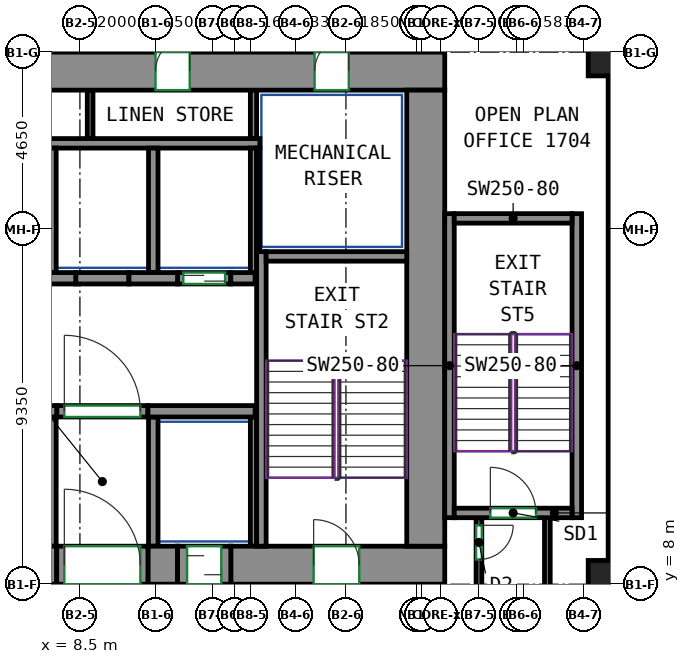
"""IFC4 building model, lengths in metres.
Left out: names, types, materials, properties, quantities, classifications, styles, units other than length and angle.
Written with IfcOpenShell. Run it as: python <this file> out.ifc"""

import sys

from ifc_helpers import new_model, si_unit, direction, frame, frame_2d, origin, origin_2d, place, context, subcontext, project, spatial, rectangle, extrude, source, transform, mapped, element, fill, save


model = new_model("IFC4")
c1 = context("Model", 3, precision=1e-05, world=origin(), true_north=direction((0.0, 1.0)))
c2 = subcontext(c1, "Body", "Model", "MODEL_VIEW")
j1 = project(units=[si_unit("LENGTHUNIT", "METRE"), si_unit("PLANEANGLEUNIT", "RADIAN")], contexts=[c1])
p1 = place(None, origin())
s1 = spatial("IfcSite", under=j1, at=p1, CompositionType="ELEMENT")
p2 = place(p1, origin())
s2 = spatial("IfcBuilding", under=s1, at=p2, CompositionType="ELEMENT")
p3 = place(p2, frame((0.0, 0.0, 75.2)))
s3 = spatial("IfcBuildingStorey", under=s2, at=p3, CompositionType="ELEMENT", Elevation=75.2)
m1 = source(origin(), c2, "Body", "SweptSolid", [
    extrude(rectangle(XDim=1.25, YDim=1.25, at=origin_2d()), origin(), (0.0, 0.0, 1.0), 3.72),
])
for number, where, z_axis, x_axis in (
    (1, (22.5, 8.0, 0.0), (0.0, 0.0, 1.0), (1.0, 0.0, 0.0)),
    (2, (22.5, 22.0, 0.0), (0.0, 0.0, 1.0), (1.0, 0.0, 0.0)),
):
    element("IfcColumn", number, at=place(p3, frame(where, z_axis=z_axis, x_axis=x_axis)), inside=s3, PredefinedType="COLUMN", context=c2, shape_type="MappedRepresentation", body=[
        mapped(m1, transform((0.0, 0.0, 0.0))),
    ])
m2 = source(origin(), c2, "Body", "SweptSolid", [
    extrude(rectangle(XDim=14.18, YDim=1.0, at=frame_2d((7.09, 0.0))), origin(), (0.0, 0.0, 1.0), 3.72),
])
p4 = place(p3, frame((-6.29, 8.5, 0.0), z_axis=(0.0, 0.0, 1.0), x_axis=(1.0, 0.0, 0.0)))
e3 = element("IfcWall", 3, at=p4, inside=s3, PredefinedType="SHEAR", context=c2, shape_type="MappedRepresentation", body=[
    mapped(m2, transform((0.0, 0.0, 0.0))),
])
m3 = source(origin(), c2, "Body", "SweptSolid", [
    extrude(rectangle(XDim=0.78, YDim=1.0, at=frame_2d((0.39, 0.0))), origin(), (0.0, 0.0, 1.0), 3.72),
])
p5 = place(p3, frame((10.29, 8.5, 0.0), z_axis=(0.0, 0.0, 1.0), x_axis=(1.0, 0.0, 0.0)))
e4 = element("IfcWall", 4, at=p5, inside=s3, PredefinedType="SHEAR", context=c2, shape_type="MappedRepresentation", body=[
    mapped(m3, transform((0.0, 0.0, 0.0))),
])
m4 = source(origin(), c2, "Body", "SweptSolid", [
    extrude(rectangle(XDim=5.63, YDim=1.0, at=frame_2d((2.815, 0.0))), origin(), (0.0, 0.0, 1.0), 3.72),
])
p6 = place(p3, frame((12.47, 8.5, 0.0), z_axis=(0.0, 0.0, 1.0), x_axis=(1.0, 0.0, 0.0)))
e5 = element("IfcWall", 5, at=p6, inside=s3, PredefinedType="SHEAR", context=c2, shape_type="MappedRepresentation", body=[
    mapped(m4, transform((0.0, 0.0, 0.0))),
])
p7 = place(p6, frame((2.18, 0.0, 0.0)))
e6 = element("IfcOpeningElement", 6, at=p7, cuts=e5, PredefinedType="OPENING", context=c2, shape_type="SweptSolid", body=[
    extrude(rectangle(XDim=1.2, YDim=2.1, at=frame_2d((0.6, 1.05))), frame((0.0, 0.51, 0.0), z_axis=(0.0, -1.0, 0.0), x_axis=(1.0, 0.0, 0.0)), (0.0, 0.0, 1.0), 1.02),
])
m5 = source(origin(), c2, "Body", "SweptSolid", [
    extrude(rectangle(XDim=34.1, YDim=1.0, at=frame_2d((17.05, 0.0))), origin(), (0.0, 0.0, 1.0), 3.72),
])
p8 = place(p3, frame((-16.0, 21.5, 0.0), z_axis=(0.0, 0.0, 1.0), x_axis=(1.0, 0.0, 0.0)))
e7 = element("IfcWall", 7, at=p8, inside=s3, PredefinedType="SHEAR", context=c2, shape_type="MappedRepresentation", body=[
    mapped(m5, transform((0.0, 0.0, 0.0))),
])
p9 = place(p8, frame((6.108, 0.0, 0.0)))
e8 = element("IfcOpeningElement", 8, at=p9, cuts=e7, PredefinedType="OPENING", context=c2, shape_type="SweptSolid", body=[
    extrude(rectangle(XDim=0.9, YDim=2.1, at=frame_2d((0.45, 1.05))), frame((0.0, 0.51, 0.0), z_axis=(0.0, -1.0, 0.0), x_axis=(1.0, 0.0, 0.0)), (0.0, 0.0, 1.0), 1.02),
])
p10 = place(p8, frame((11.173, 0.0, 0.0)))
e9 = element("IfcOpeningElement", 9, at=p10, cuts=e7, PredefinedType="OPENING", context=c2, shape_type="SweptSolid", body=[
    extrude(rectangle(XDim=0.9, YDim=2.1, at=frame_2d((0.45, 1.05))), frame((0.0, 0.51, 0.0), z_axis=(0.0, -1.0, 0.0), x_axis=(1.0, 0.0, 0.0)), (0.0, 0.0, 1.0), 1.02),
])
p11 = place(p8, frame((16.238, 0.0, 0.0)))
e10 = element("IfcOpeningElement", 10, at=p11, cuts=e7, PredefinedType="OPENING", context=c2, shape_type="SweptSolid", body=[
    extrude(rectangle(XDim=0.9, YDim=2.1, at=frame_2d((0.45, 1.05))), frame((0.0, 0.51, 0.0), z_axis=(0.0, -1.0, 0.0), x_axis=(1.0, 0.0, 0.0)), (0.0, 0.0, 1.0), 1.02),
])
p12 = place(p8, frame((21.062, 0.0, 0.0)))
e11 = element("IfcOpeningElement", 11, at=p12, cuts=e7, PredefinedType="OPENING", context=c2, shape_type="SweptSolid", body=[
    extrude(rectangle(XDim=0.9, YDim=2.1, at=frame_2d((0.45, 1.05))), frame((0.0, 0.51, 0.0), z_axis=(0.0, -1.0, 0.0), x_axis=(1.0, 0.0, 0.0)), (0.0, 0.0, 1.0), 1.02),
])
p13 = place(p8, frame((26.489, 0.0, 0.0)))
e12 = element("IfcOpeningElement", 12, at=p13, cuts=e7, PredefinedType="OPENING", context=c2, shape_type="SweptSolid", body=[
    extrude(rectangle(XDim=0.9, YDim=2.1, at=frame_2d((0.45, 1.05))), frame((0.0, 0.51, 0.0), z_axis=(0.0, -1.0, 0.0), x_axis=(1.0, 0.0, 0.0)), (0.0, 0.0, 1.0), 1.02),
])
p14 = place(p8, frame((2.525, 0.0, 0.0)))
e13 = element("IfcOpeningElement", 13, at=p14, cuts=e7, PredefinedType="OPENING", context=c2, shape_type="SweptSolid", body=[
    extrude(rectangle(XDim=0.9, YDim=2.1, at=frame_2d((0.45, 1.05))), frame((0.0, 0.51, 0.0), z_axis=(0.0, -1.0, 0.0), x_axis=(1.0, 0.0, 0.0)), (0.0, 0.0, 1.0), 1.02),
])
p15 = place(p8, frame((30.675, 0.0, 0.0)))
e14 = element("IfcOpeningElement", 14, at=p15, cuts=e7, PredefinedType="OPENING", context=c2, shape_type="SweptSolid", body=[
    extrude(rectangle(XDim=0.9, YDim=2.1, at=frame_2d((0.45, 1.05))), frame((0.0, 0.51, 0.0), z_axis=(0.0, -1.0, 0.0), x_axis=(1.0, 0.0, 0.0)), (0.0, 0.0, 1.0), 1.02),
])
m6 = source(origin(), c2, "Body", "SweptSolid", [
    extrude(rectangle(XDim=12.0, YDim=1.0, at=frame_2d((6.0, 0.0))), origin(), (0.0, 0.0, 1.0), 3.72),
])
p16 = place(p3, frame((17.6, 9.0, 0.0), z_axis=(0.0, 0.0, 1.0), x_axis=(0.0, 1.0, 0.0)))
e15 = element("IfcWall", 15, at=p16, inside=s3, PredefinedType="SHEAR", context=c2, shape_type="MappedRepresentation", body=[
    mapped(m6, transform((0.0, 0.0, 0.0))),
])
m7 = source(origin(), c2, "Body", "SweptSolid", [
    extrude(rectangle(XDim=7.75, YDim=0.25, at=frame_2d((3.875, 0.0))), origin(), (0.0, 0.0, 1.0), 3.72),
])
p17 = place(p3, frame((13.275, 9.0, 0.0), z_axis=(0.0, 0.0, 1.0), x_axis=(0.0, 1.0, 0.0)))
e16 = element("IfcWall", 16, at=p17, inside=s3, PredefinedType="SHEAR", context=c2, shape_type="MappedRepresentation", body=[
    mapped(m7, transform((0.0, 0.0, 0.0))),
])
m8 = source(origin(), c2, "Body", "SweptSolid", [
    extrude(rectangle(XDim=3.7, YDim=0.25, at=frame_2d((1.85, 0.0))), origin(), (0.0, 0.0, 1.0), 3.72),
])
p18 = place(p3, frame((13.4, 16.625, 0.0), z_axis=(0.0, 0.0, 1.0), x_axis=(1.0, 0.0, 0.0)))
e17 = element("IfcWall", 17, at=p18, inside=s3, PredefinedType="SHEAR", context=c2, shape_type="MappedRepresentation", body=[
    mapped(m8, transform((0.0, 0.0, 0.0))),
])
m9 = source(origin(), c2, "Body", "SweptSolid", [
    extrude(rectangle(XDim=8.0, YDim=0.25, at=frame_2d((4.0, 0.0))), origin(), (0.0, 0.0, 1.0), 3.72),
])
for number, where, z_axis, x_axis in (
    (18, (18.225, 9.75, 0.0), (0.0, 0.0, 1.0), (0.0, 1.0, 0.0)),
    (19, (21.575, 9.75, 0.0), (0.0, 0.0, 1.0), (0.0, 1.0, 0.0)),
):
    element("IfcWall", number, at=place(p3, frame(where, z_axis=z_axis, x_axis=x_axis)), inside=s3, PredefinedType="SHEAR", context=c2, shape_type="MappedRepresentation", body=[
        mapped(m9, transform((0.0, 0.0, 0.0))),
    ])
m10 = source(origin(), c2, "Body", "SweptSolid", [
    extrude(rectangle(XDim=3.1, YDim=0.25, at=frame_2d((1.55, 0.0))), origin(), (0.0, 0.0, 1.0), 3.72),
])
p19 = place(p3, frame((18.35, 9.875, 0.0), z_axis=(0.0, 0.0, 1.0), x_axis=(1.0, 0.0, 0.0)))
e20 = element("IfcWall", 20, at=p19, inside=s3, PredefinedType="SHEAR", context=c2, shape_type="MappedRepresentation", body=[
    mapped(m10, transform((0.0, 0.0, 0.0))),
])
p20 = place(p19, frame((0.95, 0.0, 0.0)))
e21 = element("IfcOpeningElement", 21, at=p20, cuts=e20, PredefinedType="OPENING", context=c2, shape_type="SweptSolid", body=[
    extrude(rectangle(XDim=1.2, YDim=2.1, at=frame_2d((0.6, 1.05))), frame((0.0, 0.135, 0.0), z_axis=(0.0, -1.0, 0.0), x_axis=(1.0, 0.0, 0.0)), (0.0, 0.0, 1.0), 0.27),
])
p21 = place(p3, frame((18.35, 17.625, 0.0), z_axis=(0.0, 0.0, 1.0), x_axis=(1.0, 0.0, 0.0)))
e22 = element("IfcWall", 22, at=p21, inside=s3, PredefinedType="SHEAR", context=c2, shape_type="MappedRepresentation", body=[
    mapped(m10, transform((0.0, 0.0, 0.0))),
])
m11 = source(origin(), c2, "Body", "SweptSolid", [
    extrude(rectangle(XDim=0.78, YDim=0.3, at=frame_2d((0.39, 0.0))), origin(), (0.0, 0.0, 1.0), 3.72),
])
p22 = place(p3, frame((7.11, 12.55, 0.0), z_axis=(0.0, 0.0, 1.0), x_axis=(1.0, 0.0, 0.0)))
e23 = element("IfcWall", 23, at=p22, inside=s3, PredefinedType="SHEAR", context=c2, shape_type="MappedRepresentation", body=[
    mapped(m11, transform((0.0, 0.0, 0.0))),
])
m12 = source(origin(), c2, "Body", "SweptSolid", [
    extrude(rectangle(XDim=2.82, YDim=0.3, at=frame_2d((1.41, 0.0))), origin(), (0.0, 0.0, 1.0), 3.72),
])
p23 = place(p3, frame((10.29, 12.55, 0.0), z_axis=(0.0, 0.0, 1.0), x_axis=(1.0, 0.0, 0.0)))
e24 = element("IfcWall", 24, at=p23, inside=s3, PredefinedType="SHEAR", context=c2, shape_type="MappedRepresentation", body=[
    mapped(m12, transform((0.0, 0.0, 0.0))),
])
m13 = source(origin(), c2, "Body", "SweptSolid", [
    extrude(rectangle(XDim=1.28, YDim=0.3, at=frame_2d((0.64, 0.0))), origin(), (0.0, 0.0, 1.0), 3.72),
])
p24 = place(p3, frame((7.11, 16.05, 0.0), z_axis=(0.0, 0.0, 1.0), x_axis=(1.0, 0.0, 0.0)))
e25 = element("IfcWall", 25, at=p24, inside=s3, PredefinedType="SHEAR", context=c2, shape_type="MappedRepresentation", body=[
    mapped(m13, transform((0.0, 0.0, 0.0))),
])
m14 = source(origin(), c2, "Body", "SweptSolid", [
    extrude(rectangle(XDim=1.28, YDim=0.3, at=frame_2d((0.64, 0.0))), origin(), (0.0, 0.0, 1.0), 3.72),
])
p25 = place(p3, frame((9.79, 16.05, 0.0), z_axis=(0.0, 0.0, 1.0), x_axis=(1.0, 0.0, 0.0)))
e26 = element("IfcWall", 26, at=p25, inside=s3, PredefinedType="SHEAR", context=c2, shape_type="MappedRepresentation", body=[
    mapped(m14, transform((0.0, 0.0, 0.0))),
])
m15 = source(origin(), c2, "Body", "SweptSolid", [
    extrude(rectangle(XDim=0.64, YDim=0.3, at=frame_2d((0.32, 0.0))), origin(), (0.0, 0.0, 1.0), 3.72),
])
p26 = place(p3, frame((12.47, 16.05, 0.0), z_axis=(0.0, 0.0, 1.0), x_axis=(1.0, 0.0, 0.0)))
e27 = element("IfcWall", 27, at=p26, inside=s3, PredefinedType="SHEAR", context=c2, shape_type="MappedRepresentation", body=[
    mapped(m15, transform((0.0, 0.0, 0.0))),
])
m16 = source(origin(), c2, "Body", "SweptSolid", [
    extrude(rectangle(XDim=1.4, YDim=0.3, at=frame_2d((0.7, 0.0))), origin(), (0.0, 0.0, 1.0), 3.72),
])
p27 = place(p3, frame((11.07, 16.05, 0.0), z_axis=(0.0, 0.0, 1.0), x_axis=(1.0, 0.0, 0.0)))
e28 = element("IfcWall", 28, at=p27, inside=s3, PredefinedType="PARTITIONING", context=c2, shape_type="MappedRepresentation", body=[
    mapped(m16, transform((0.0, 0.0, 0.0))),
])
p28 = place(p27, frame((0.15, 0.0, 0.0)))
e29 = element("IfcOpeningElement", 29, at=p28, cuts=e28, PredefinedType="OPENING", context=c2, shape_type="SweptSolid", body=[
    extrude(rectangle(XDim=1.1, YDim=2.1, at=frame_2d((0.55, 1.05))), frame((0.0, 0.16, 0.0), z_axis=(0.0, -1.0, 0.0), x_axis=(1.0, 0.0, 0.0)), (0.0, 0.0, 1.0), 0.32),
])
m17 = source(origin(), c2, "Body", "SweptSolid", [
    extrude(rectangle(XDim=2.4, YDim=0.3, at=frame_2d((1.2, 0.0))), origin(), (0.0, 0.0, 1.0), 3.72),
])
p29 = place(p3, frame((7.89, 12.55, 0.0), z_axis=(0.0, 0.0, 1.0), x_axis=(1.0, 0.0, 0.0)))
e30 = element("IfcWall", 30, at=p29, inside=s3, PredefinedType="PARTITIONING", context=c2, shape_type="MappedRepresentation", body=[
    mapped(m17, transform((0.0, 0.0, 0.0))),
])
p30 = place(p29, frame((0.2, 0.0, 0.0)))
e31 = element("IfcOpeningElement", 31, at=p30, cuts=e30, PredefinedType="OPENING", context=c2, shape_type="SweptSolid", body=[
    extrude(rectangle(XDim=2.0, YDim=2.1, at=frame_2d((1.0, 1.05))), frame((0.0, 0.16, 0.0), z_axis=(0.0, -1.0, 0.0), x_axis=(1.0, 0.0, 0.0)), (0.0, 0.0, 1.0), 0.32),
])
m18 = source(origin(), c2, "Body", "SweptSolid", [
    extrude(rectangle(XDim=1.4, YDim=0.3, at=frame_2d((0.7, 0.0))), origin(), (0.0, 0.0, 1.0), 3.72),
])
p31 = place(p3, frame((8.39, 16.05, 0.0), z_axis=(0.0, 0.0, 1.0), x_axis=(1.0, 0.0, 0.0)))
e32 = element("IfcWall", 32, at=p31, inside=s3, PredefinedType="PARTITIONING", context=c2, shape_type="MappedRepresentation", body=[
    mapped(m18, transform((0.0, 0.0, 0.0))),
])
m19 = source(origin(), c2, "Body", "SweptSolid", [
    extrude(rectangle(XDim=24.37, YDim=0.25, at=frame_2d((12.185, 0.0))), origin(), (0.0, 0.0, 1.0), 3.72),
])
p32 = place(p3, frame((-11.135, 19.6, 0.0), z_axis=(0.0, 0.0, 1.0), x_axis=(1.0, 0.0, 0.0)))
e33 = element("IfcWall", 33, at=p32, inside=s3, PredefinedType="PARTITIONING", context=c2, shape_type="MappedRepresentation", body=[
    mapped(m19, transform((0.0, 0.0, 0.0))),
])
m20 = source(origin(), c2, "Body", "SweptSolid", [
    extrude(rectangle(XDim=3.275, YDim=0.165, at=frame_2d((1.638, 0.0))), origin(), (0.0, 0.0, 1.0), 3.72),
])
p33 = place(p3, frame((13.067, 16.2, 0.0), z_axis=(0.0, 0.0, 1.0), x_axis=(0.0, 1.0, 0.0)))
e34 = element("IfcWall", 34, at=p33, inside=s3, PredefinedType="PARTITIONING", context=c2, shape_type="MappedRepresentation", body=[
    mapped(m20, transform((0.0, 0.0, 0.0))),
])
m21 = source(origin(), c2, "Body", "SweptSolid", [
    extrude(rectangle(XDim=1.275, YDim=0.165, at=frame_2d((0.637, 0.0))), origin(), (0.0, 0.0, 1.0), 3.72),
])
p34 = place(p3, frame((13.067, 19.725, 0.0), z_axis=(0.0, 0.0, 1.0), x_axis=(0.0, 1.0, 0.0)))
e35 = element("IfcWall", 35, at=p34, inside=s3, PredefinedType="PARTITIONING", context=c2, shape_type="MappedRepresentation", body=[
    mapped(m21, transform((0.0, 0.0, 0.0))),
])
m22 = source(origin(), c2, "Body", "SweptSolid", [
    extrude(rectangle(XDim=3.275, YDim=0.25, at=frame_2d((1.638, 0.0))), origin(), (0.0, 0.0, 1.0), 3.72),
])
p35 = place(p3, frame((10.43, 16.2, 0.0), z_axis=(0.0, 0.0, 1.0), x_axis=(0.0, 1.0, 0.0)))
e36 = element("IfcWall", 36, at=p35, inside=s3, PredefinedType="PARTITIONING", context=c2, shape_type="MappedRepresentation", body=[
    mapped(m22, transform((0.0, 0.0, 0.0))),
])
m23 = source(origin(), c2, "Body", "SweptSolid", [
    extrude(rectangle(XDim=2.725, YDim=0.085, at=frame_2d((1.363, 0.0))), origin(), (0.0, 0.0, 1.0), 3.72),
])
p36 = place(p3, frame((13.192, 16.75, 0.0), z_axis=(0.0, 0.0, 1.0), x_axis=(0.0, 1.0, 0.0)))
e37 = element("IfcWall", 37, at=p36, inside=s3, PredefinedType="PARTITIONING", context=c2, shape_type="MappedRepresentation", body=[
    mapped(m23, transform((0.0, 0.0, 0.0))),
])
p37 = place(p3, frame((7.75, 16.2, 0.0), z_axis=(0.0, 0.0, 1.0), x_axis=(0.0, 1.0, 0.0)))
e38 = element("IfcWall", 38, at=p37, inside=s3, PredefinedType="PARTITIONING", context=c2, shape_type="MappedRepresentation", body=[
    mapped(m22, transform((0.0, 0.0, 0.0))),
])
m24 = source(origin(), c2, "Body", "SweptSolid", [
    extrude(rectangle(XDim=3.4, YDim=0.25, at=frame_2d((1.7, 0.0))), origin(), (0.0, 0.0, 1.0), 3.72),
])
p38 = place(p3, frame((10.43, 9.0, 0.0), z_axis=(0.0, 0.0, 1.0), x_axis=(0.0, 1.0, 0.0)))
e39 = element("IfcWall", 39, at=p38, inside=s3, PredefinedType="PARTITIONING", context=c2, shape_type="MappedRepresentation", body=[
    mapped(m24, transform((0.0, 0.0, 0.0))),
])
m25 = source(origin(), c2, "Body", "SweptSolid", [
    extrude(rectangle(XDim=3.4, YDim=0.165, at=frame_2d((1.7, 0.0))), origin(), (0.0, 0.0, 1.0), 3.72),
])
p39 = place(p3, frame((13.067, 9.0, 0.0), z_axis=(0.0, 0.0, 1.0), x_axis=(0.0, 1.0, 0.0)))
e40 = element("IfcWall", 40, at=p39, inside=s3, PredefinedType="PARTITIONING", context=c2, shape_type="MappedRepresentation", body=[
    mapped(m25, transform((0.0, 0.0, 0.0))),
])
p40 = place(p3, frame((7.75, 9.0, 0.0), z_axis=(0.0, 0.0, 1.0), x_axis=(0.0, 1.0, 0.0)))
e41 = element("IfcWall", 41, at=p40, inside=s3, PredefinedType="PARTITIONING", context=c2, shape_type="MappedRepresentation", body=[
    mapped(m24, transform((0.0, 0.0, 0.0))),
])
m26 = source(origin(), c2, "Body", "SweptSolid", [
    extrude(rectangle(XDim=1.275, YDim=0.15, at=frame_2d((0.637, 0.0))), origin(), (0.0, 0.0, 1.0), 3.72),
])
p41 = place(p3, frame((8.768, 19.725, 0.0), z_axis=(0.0, 0.0, 1.0), x_axis=(0.0, 1.0, 0.0)))
e42 = element("IfcWall", 42, at=p41, inside=s3, PredefinedType="PARTITIONING", context=c2, shape_type="MappedRepresentation", body=[
    mapped(m26, transform((0.0, 0.0, 0.0))),
])
m27 = source(origin(), c2, "Body", "SweptSolid", [
    extrude(rectangle(XDim=2.4, YDim=1.0, at=frame_2d((1.2, 0.0))), origin(), (0.0, 0.0, 1.0), 2.7),
])
p42 = place(p3, frame((7.89, 8.5, 0.0), z_axis=(0.0, 0.0, 1.0), x_axis=(1.0, 0.0, 0.0)))
e43 = element("IfcWall", 43, at=p42, inside=s3, PredefinedType="PARTITIONING", context=c2, shape_type="MappedRepresentation", body=[
    mapped(m27, transform((0.0, 0.0, 0.0))),
])
p43 = place(p42, frame((0.2, 0.0, 0.0)))
e44 = element("IfcOpeningElement", 44, at=p43, cuts=e43, PredefinedType="OPENING", context=c2, shape_type="SweptSolid", body=[
    extrude(rectangle(XDim=2.0, YDim=2.1, at=frame_2d((1.0, 1.05))), frame((0.0, 0.51, 0.0), z_axis=(0.0, -1.0, 0.0), x_axis=(1.0, 0.0, 0.0)), (0.0, 0.0, 1.0), 1.02),
])
m28 = source(origin(), c2, "Body", "SweptSolid", [
    extrude(rectangle(XDim=1.4, YDim=1.0, at=frame_2d((0.7, 0.0))), origin(), (0.0, 0.0, 1.0), 2.7),
])
p44 = place(p3, frame((11.07, 8.5, 0.0), z_axis=(0.0, 0.0, 1.0), x_axis=(1.0, 0.0, 0.0)))
e45 = element("IfcWall", 45, at=p44, inside=s3, PredefinedType="PARTITIONING", context=c2, shape_type="MappedRepresentation", body=[
    mapped(m28, transform((0.0, 0.0, 0.0))),
])
p45 = place(p44, frame((0.25, 0.0, 0.0)))
e46 = element("IfcOpeningElement", 46, at=p45, cuts=e45, PredefinedType="OPENING", context=c2, shape_type="SweptSolid", body=[
    extrude(rectangle(XDim=0.9, YDim=2.1, at=frame_2d((0.45, 1.05))), frame((0.0, 0.51, 0.0), z_axis=(0.0, -1.0, 0.0), x_axis=(1.0, 0.0, 0.0)), (0.0, 0.0, 1.0), 1.02),
])
p46 = place(p3, frame((19.0, 9.75, 0.0), z_axis=(0.0, 0.0, 1.0), x_axis=(0.0, -1.0, 0.0)))
e47 = element("IfcWall", 47, at=p46, inside=s3, PredefinedType="PARTITIONING", context=c2, shape_type="SweptSolid", body=[
    extrude(rectangle(XDim=4.975, YDim=0.15, at=frame_2d((2.488, 0.0))), origin(), (0.0, 0.0, 1.0), 3.72),
])
p47 = place(p46, frame((0.2, 0.0, 0.0)))
e48 = element("IfcOpeningElement", 48, at=p47, cuts=e47, PredefinedType="OPENING", context=c2, shape_type="SweptSolid", body=[
    extrude(rectangle(XDim=0.9, YDim=2.1, at=frame_2d((0.45, 1.05))), frame((0.0, 0.085, 0.0), z_axis=(0.0, -1.0, 0.0), x_axis=(1.0, 0.0, 0.0)), (0.0, 0.0, 1.0), 0.17),
])
p48 = place(p3, frame((20.8, 4.775, 0.0), z_axis=(0.0, 0.0, 1.0), x_axis=(0.0, 1.0, 0.0)))
e49 = element("IfcWall", 49, at=p48, inside=s3, PredefinedType="PARTITIONING", context=c2, shape_type="SweptSolid", body=[
    extrude(rectangle(XDim=4.975, YDim=0.15, at=frame_2d((2.488, 0.0))), origin(), (0.0, 0.0, 1.0), 3.72),
])
p49 = place(p3, frame((22.5, 8.625, 0.0), z_axis=(0.0, 0.0, 1.0), x_axis=(0.0, 1.0, 0.0)))
e50 = element("IfcWall", 50, at=p49, inside=s3, PredefinedType="PARTITIONING", context=c2, shape_type="SweptSolid", body=[
    extrude(rectangle(XDim=12.75, YDim=0.2, at=frame_2d((6.375, 0.0))), origin(), (0.0, 0.0, 1.0), 3.07),
])
p50 = place(p30, origin())
e51 = element("IfcDoor", 51, at=p50, inside=s3, OperationType="DOUBLE_DOOR_SINGLE_SWING", PredefinedType="DOOR", context=c2, shape_type="SweptSolid", body=[
    extrude(rectangle(XDim=2.0, YDim=2.1, at=frame_2d((1.0, 1.05))), frame((0.0, 0.025, 0.0), z_axis=(0.0, -1.0, 0.0), x_axis=(1.0, 0.0, 0.0)), (0.0, 0.0, 1.0), 0.05),
])
fill(e31, e51)
p51 = place(p43, origin())
e52 = element("IfcDoor", 52, at=p51, inside=s3, OperationType="DOUBLE_DOOR_SINGLE_SWING", PredefinedType="DOOR", context=c2, shape_type="SweptSolid", body=[
    extrude(rectangle(XDim=2.0, YDim=2.1, at=frame_2d((1.0, 1.05))), frame((0.0, 0.405, 0.0), z_axis=(0.0, -1.0, 0.0), x_axis=(1.0, 0.0, 0.0)), (0.0, 0.0, 1.0), 0.05),
])
fill(e44, e52)
p52 = place(p45, origin())
e53 = element("IfcDoor", 53, at=p52, inside=s3, OperationType="SLIDING_TO_LEFT", PredefinedType="DOOR", context=c2, shape_type="SweptSolid", body=[
    extrude(rectangle(XDim=0.9, YDim=2.1, at=frame_2d((0.45, 1.05))), frame((0.0, 0.405, 0.0), z_axis=(0.0, -1.0, 0.0), x_axis=(1.0, 0.0, 0.0)), (0.0, 0.0, 1.0), 0.05),
])
fill(e46, e53)
p53 = place(p28, origin())
e54 = element("IfcDoor", 54, at=p53, inside=s3, OperationType="DOUBLE_DOOR_SLIDING", PredefinedType="DOOR", context=c2, shape_type="SweptSolid", body=[
    extrude(rectangle(XDim=1.1, YDim=2.1, at=frame_2d((0.55, 1.05))), frame((0.0, 0.025, 0.0), z_axis=(0.0, -1.0, 0.0), x_axis=(1.0, 0.0, 0.0)), (0.0, 0.0, 1.0), 0.05),
])
fill(e29, e54)
p54 = place(p13, origin())
e55 = element("IfcDoor", 55, at=p54, inside=s3, OperationType="SINGLE_SWING_RIGHT", PredefinedType="DOOR", context=c2, shape_type="SweptSolid", body=[
    extrude(rectangle(XDim=0.9, YDim=2.1, at=frame_2d((0.45, 1.05))), frame((0.0, -0.355, 0.0), z_axis=(0.0, -1.0, 0.0), x_axis=(1.0, 0.0, 0.0)), (0.0, 0.0, 1.0), 0.05),
])
fill(e12, e55)
p55 = place(p15, origin())
e56 = element("IfcDoor", 56, at=p55, inside=s3, OperationType="SINGLE_SWING_RIGHT", PredefinedType="DOOR", context=c2, shape_type="SweptSolid", body=[
    extrude(rectangle(XDim=0.9, YDim=2.1, at=frame_2d((0.45, 1.05))), frame((0.0, -0.355, 0.0), z_axis=(0.0, -1.0, 0.0), x_axis=(1.0, 0.0, 0.0)), (0.0, 0.0, 1.0), 0.05),
])
fill(e14, e56)
p56 = place(p7, origin())
e57 = element("IfcDoor", 57, at=p56, inside=s3, OperationType="DOUBLE_DOOR_SINGLE_SWING", PredefinedType="DOOR", context=c2, shape_type="SweptSolid", body=[
    extrude(rectangle(XDim=1.2, YDim=2.1, at=frame_2d((0.6, 1.05))), frame((0.0, 0.405, 0.0), z_axis=(0.0, -1.0, 0.0), x_axis=(1.0, 0.0, 0.0)), (0.0, 0.0, 1.0), 0.05),
])
fill(e6, e57)
p57 = place(p20, origin())
e58 = element("IfcDoor", 58, at=p57, inside=s3, OperationType="DOUBLE_DOOR_SINGLE_SWING", PredefinedType="DOOR", context=c2, shape_type="SweptSolid", body=[
    extrude(rectangle(XDim=1.2, YDim=2.1, at=frame_2d((0.6, 1.05))), frame((0.0, 0.025, 0.0), z_axis=(0.0, -1.0, 0.0), x_axis=(1.0, 0.0, 0.0)), (0.0, 0.0, 1.0), 0.05),
])
fill(e21, e58)
p58 = place(p47, origin())
e59 = element("IfcDoor", 59, at=p58, inside=s3, OperationType="SINGLE_SWING_LEFT", PredefinedType="DOOR", context=c2, shape_type="SweptSolid", body=[
    extrude(rectangle(XDim=0.9, YDim=2.1, at=frame_2d((0.45, 1.05))), frame((0.0, 0.025, 0.0), z_axis=(0.0, -1.0, 0.0), x_axis=(1.0, 0.0, 0.0)), (0.0, 0.0, 1.0), 0.05),
])
fill(e48, e59)
save(model, sys.argv[1])
